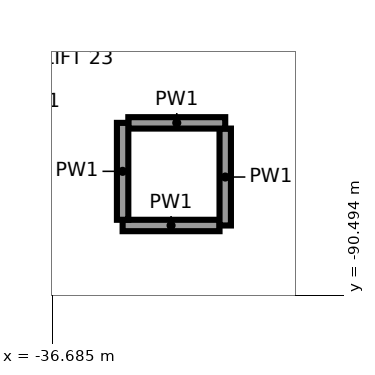
"""IFC4 building model, lengths in metres.
Left out: names, types, materials, properties, quantities, classifications, styles, units other than length and angle.
Written with IfcOpenShell. Run it as: python <this file> out.ifc"""

import sys

from ifc_helpers import new_model, si_unit, direction, frame, frame_2d, origin, origin_2d, place, context, subcontext, project, spatial, rectangle, circle, extrude, element, save


model = new_model("IFC4")
c1 = context("Model", 3, precision=1e-05, world=origin(), true_north=direction((0.0, 1.0)))
c2 = subcontext(c1, "Body", "Model", "MODEL_VIEW")
j1 = project(units=[si_unit("LENGTHUNIT", "METRE"), si_unit("PLANEANGLEUNIT", "RADIAN")], contexts=[c1])
p1 = place(None, origin())
s1 = spatial("IfcSite", under=j1, at=p1, CompositionType="ELEMENT")
p2 = place(p1, origin())
s2 = spatial("IfcBuilding", under=s1, at=p2, CompositionType="ELEMENT")
p3 = place(p2, origin())
s3 = spatial("IfcBuildingStorey", under=s2, at=p3, CompositionType="ELEMENT", Elevation=0.0)
p4 = place(p3, frame((-32.944, -90.551, 0.0), z_axis=(0.0, 0.0, 1.0), x_axis=(1.0, 0.0, 0.0)))
e1 = element("IfcColumn", 1, at=p4, inside=s3, PredefinedType="COLUMN", context=c2, shape_type="SweptSolid", body=[
    extrude(circle(Radius=0.55, at=origin_2d()), origin(), (0.0, 0.0, 1.0), 6.5),
])
p5 = place(p3, frame((-35.758, -89.576, 0.0), z_axis=(0.0, 0.0, 1.0), x_axis=(1.0, 0.0, 0.0)))
e2 = element("IfcWall", 2, at=p5, inside=s3, PredefinedType="PARTITIONING", context=c2, shape_type="SweptSolid", body=[
    extrude(rectangle(XDim=1.275, YDim=0.15, at=frame_2d((0.637, 0.0))), origin(), (0.0, 0.0, 1.0), 6.15),
])
for number, where, z_axis, x_axis in (
    (3, (-34.408, -89.576, 0.0), (0.0, 0.0, 1.0), (0.0, 1.0, 0.0)),
    (4, (-34.408, -88.226, 0.0), (0.0, 0.0, 1.0), (-1.0, 0.0, 0.0)),
    (5, (-35.758, -88.226, 0.0), (0.0, 0.0, 1.0), (0.0, -1.0, 0.0)),
):
    element("IfcWall", number, at=place(p3, frame(where, z_axis=z_axis, x_axis=x_axis)), inside=s3, PredefinedType="PARTITIONING", context=c2, shape_type="SweptSolid", body=[
        extrude(rectangle(XDim=1.275, YDim=0.15, at=frame_2d((0.638, 0.0))), origin(), (0.0, 0.0, 1.0), 6.15),
    ])
save(model, sys.argv[1])
